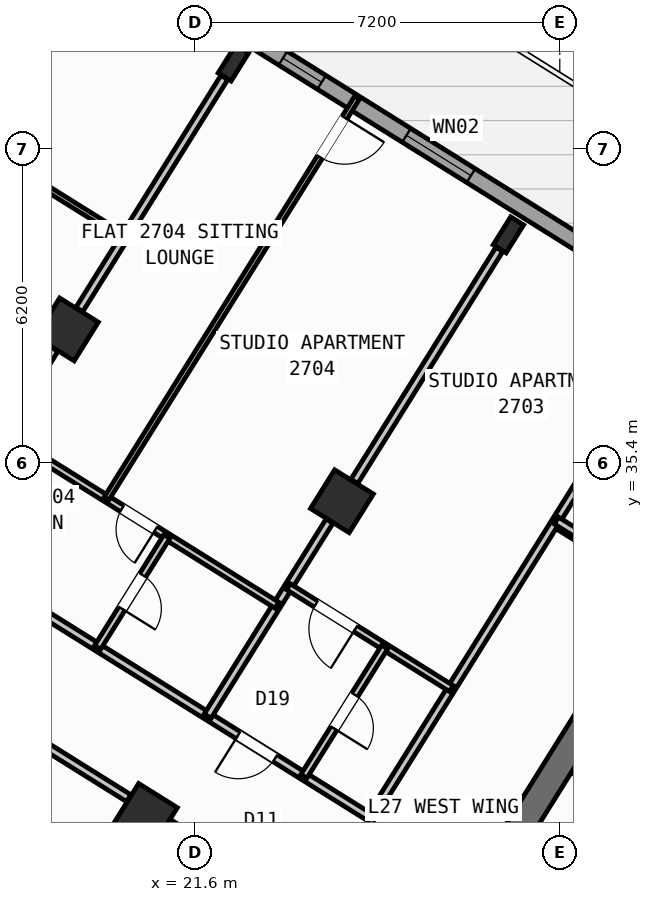
"""IFC4 building model, lengths in metres.
Left out: names, types, materials, properties, quantities, classifications, styles, units other than length and angle.
Written with IfcOpenShell. Run it as: python <this file> out.ifc"""

import sys

from ifc_helpers import new_model, si_unit, direction, frame, frame_2d, origin, origin_2d, place, context, subcontext, project, spatial, rectangle, hollow_rectangle, i_section, extrude, source, transform, mapped, element, fill, save


model = new_model("IFC4")
c1 = context("Model", 3, precision=1e-05, world=origin(), true_north=direction((0.0, 1.0)))
c2 = subcontext(c1, "Body", "Model", "MODEL_VIEW")
j1 = project(units=[si_unit("LENGTHUNIT", "METRE"), si_unit("PLANEANGLEUNIT", "RADIAN")], contexts=[c1])
p1 = place(None, origin())
s1 = spatial("IfcSite", under=j1, at=p1, CompositionType="ELEMENT")
p2 = place(p1, origin())
s2 = spatial("IfcBuilding", under=s1, at=p2, CompositionType="ELEMENT")
p3 = place(p2, frame((0.0, 0.0, 108.9)))
s3 = spatial("IfcBuildingStorey", under=s2, at=p3, CompositionType="ELEMENT", Elevation=108.9)
p4 = place(p3, frame((29.517, 30.594, 0.0), z_axis=(0.0, 0.0, 1.0), x_axis=(-0.529906864564, -0.848055844204, 0.0)))
e1 = element("IfcWall", 1, at=p4, inside=s3, PredefinedType="SHEAR", context=c2, shape_type="SweptSolid", body=[
    extrude(rectangle(XDim=3.575, YDim=0.55, at=frame_2d((1.788, 0.0))), origin(), (0.0, 0.0, 1.0), 3.35),
])
m1 = source(origin(), c2, "Body", "SweptSolid", [
    extrude(i_section(OverallWidth=0.3, OverallDepth=0.65, WebThickness=0.016, FlangeThickness=0.031, at=origin_2d()), origin(), (0.0, 0.0, 1.0), 3.6),
])
p5 = place(p3, frame((27.786, 39.901, 0.0), z_axis=(0.0, 0.0, 1.0), x_axis=(-0.848048096156, 0.529919264233, 0.0)))
e2 = element("IfcColumn", 2, at=p5, inside=s3, PredefinedType="COLUMN", context=c2, shape_type="MappedRepresentation", body=[
    mapped(m1, transform((0.0, 0.0, 0.0), scale=1.0)),
])
m2 = source(origin(), c2, "Body", "SweptSolid", [
    extrude(hollow_rectangle(XDim=0.9, YDim=0.9, WallThickness=0.036, at=origin_2d()), origin(), (0.0, 0.0, 1.0), 3.6),
])
for number, where, z_axis, x_axis in (
    (3, (24.5, 34.643, 0.0), (0.0, 0.0, 1.0), (-0.848, 0.53, 0.0)),
    (4, (20.632, 28.452, 0.0), (0.0, 0.0, 1.0), (-0.848, 0.53, 0.0)),
):
    element("IfcColumn", number, at=place(p3, frame(where, z_axis=z_axis, x_axis=x_axis)), inside=s3, PredefinedType="COLUMN", context=c2, shape_type="MappedRepresentation", body=[
        mapped(m2, transform((0.0, 0.0, 0.0), scale=1.0)),
    ])
p6 = place(p3, frame((22.358, 43.292, 0.0), z_axis=(0.0, 0.0, 1.0), x_axis=(-0.848048096156, 0.529919264233, 0.0)))
e5 = element("IfcColumn", 5, at=p6, inside=s3, PredefinedType="COLUMN", context=c2, shape_type="MappedRepresentation", body=[
    mapped(m1, transform((0.0, 0.0, 0.0), scale=1.0)),
])
p7 = place(p3, frame((19.073, 38.034, 0.0), z_axis=(0.0, 0.0, 1.0), x_axis=(-0.848048096156, 0.529919264233, 0.0)))
e6 = element("IfcColumn", 6, at=p7, inside=s3, PredefinedType="COLUMN", context=c2, shape_type="MappedRepresentation", body=[
    mapped(m2, transform((0.0, 0.0, 0.0), scale=1.0)),
])
p8 = place(p3, frame((31.76, 12.183, 0.0), z_axis=(0.0, 0.0, 1.0), x_axis=(-0.848047074256, 0.529920899612, 0.0)))
e7 = element("IfcWall", 7, at=p8, inside=s3, PredefinedType="STANDARD", context=c2, shape_type="SweptSolid", body=[
    extrude(rectangle(XDim=30.652, YDim=0.32, at=frame_2d((15.326, 0.0))), origin(), (0.0, 0.0, 1.0), 3.35),
])
p9 = place(p8, frame((15.153, 0.0, 0.0)))
e8 = element("IfcOpeningElement", 8, at=p9, cuts=e7, PredefinedType="OPENING", context=c2, shape_type="SweptSolid", body=[
    extrude(rectangle(XDim=1.2, YDim=2.15, at=frame_2d((0.6, 1.075))), frame((0.0, 0.17, 0.0), z_axis=(0.0, -1.0, 0.0), x_axis=(1.0, 0.0, 0.0)), (0.0, 0.0, 1.0), 0.34),
])
p10 = place(p8, frame((2.002, 0.0, 0.8)))
e9 = element("IfcOpeningElement", 9, at=p10, cuts=e7, PredefinedType="OPENING", context=c2, shape_type="SweptSolid", body=[
    extrude(rectangle(XDim=2.1, YDim=1.55, at=frame_2d((1.05, 0.775))), frame((0.0, 0.17, 0.0), z_axis=(0.0, -1.0, 0.0), x_axis=(1.0, 0.0, 0.0)), (0.0, 0.0, 1.0), 0.34),
])
p11 = place(p8, frame((7.206, 0.0, 0.8)))
e10 = element("IfcOpeningElement", 10, at=p11, cuts=e7, PredefinedType="OPENING", context=c2, shape_type="SweptSolid", body=[
    extrude(rectangle(XDim=2.1, YDim=1.55, at=frame_2d((1.05, 0.775))), frame((0.0, 0.17, 0.0), z_axis=(0.0, -1.0, 0.0), x_axis=(1.0, 0.0, 0.0)), (0.0, 0.0, 1.0), 0.34),
])
p12 = place(p8, frame((12.648, 0.0, 1.0)))
e11 = element("IfcOpeningElement", 11, at=p12, cuts=e7, PredefinedType="OPENING", context=c2, shape_type="SweptSolid", body=[
    extrude(rectangle(XDim=0.9, YDim=1.25, at=frame_2d((0.45, 0.625))), frame((0.0, 0.17, 0.0), z_axis=(0.0, -1.0, 0.0), x_axis=(1.0, 0.0, 0.0)), (0.0, 0.0, 1.0), 0.34),
])
p13 = place(p8, frame((19.59, 0.0, 0.95)))
e12 = element("IfcOpeningElement", 12, at=p13, cuts=e7, PredefinedType="OPENING", context=c2, shape_type="SweptSolid", body=[
    extrude(rectangle(XDim=1.2, YDim=1.4, at=frame_2d((0.6, 0.7))), frame((0.0, 0.17, 0.0), z_axis=(0.0, -1.0, 0.0), x_axis=(1.0, 0.0, 0.0)), (0.0, 0.0, 1.0), 0.34),
])
p14 = place(p8, frame((25.966, 0.0, 1.0)))
e13 = element("IfcOpeningElement", 13, at=p14, cuts=e7, PredefinedType="OPENING", context=c2, shape_type="SweptSolid", body=[
    extrude(rectangle(XDim=0.9, YDim=1.25, at=frame_2d((0.45, 0.625))), frame((0.0, 0.17, 0.0), z_axis=(0.0, -1.0, 0.0), x_axis=(1.0, 0.0, 0.0)), (0.0, 0.0, 1.0), 0.34),
])
p15 = place(p8, frame((28.871, 0.0, 1.0)))
e14 = element("IfcOpeningElement", 14, at=p15, cuts=e7, PredefinedType="OPENING", context=c2, shape_type="SweptSolid", body=[
    extrude(rectangle(XDim=0.9, YDim=1.25, at=frame_2d((0.45, 0.625))), frame((0.0, 0.17, 0.0), z_axis=(0.0, -1.0, 0.0), x_axis=(1.0, 0.0, 0.0)), (0.0, 0.0, 1.0), 0.34),
])
p16 = place(p3, frame((17.424, 47.083, 0.0), z_axis=(0.0, 0.0, 1.0), x_axis=(0.848049927979, -0.529916332693, 0.0)))
e15 = element("IfcWall", 15, at=p16, inside=s3, PredefinedType="STANDARD", context=c2, shape_type="SweptSolid", body=[
    extrude(rectangle(XDim=29.223, YDim=0.32, at=frame_2d((14.612, 0.0))), origin(), (0.0, 0.0, 1.0), 3.35),
])
p17 = place(p16, frame((3.77, 0.0, 0.0)))
e16 = element("IfcOpeningElement", 16, at=p17, cuts=e15, PredefinedType="OPENING", context=c2, shape_type="SweptSolid", body=[
    extrude(rectangle(XDim=1.05, YDim=2.15, at=frame_2d((0.525, 1.075))), frame((0.0, 0.17, 0.0), z_axis=(0.0, -1.0, 0.0), x_axis=(1.0, 0.0, 0.0)), (0.0, 0.0, 1.0), 0.34),
])
p18 = place(p16, frame((0.9, 0.0, 0.8)))
e17 = element("IfcOpeningElement", 17, at=p18, cuts=e15, PredefinedType="OPENING", context=c2, shape_type="SweptSolid", body=[
    extrude(rectangle(XDim=2.1, YDim=1.55, at=frame_2d((1.05, 0.775))), frame((0.0, 0.17, 0.0), z_axis=(0.0, -1.0, 0.0), x_axis=(1.0, 0.0, 0.0)), (0.0, 0.0, 1.0), 0.34),
])
p19 = place(p16, frame((6.972, 0.0, 1.0)))
e18 = element("IfcOpeningElement", 18, at=p19, cuts=e15, PredefinedType="OPENING", context=c2, shape_type="SweptSolid", body=[
    extrude(rectangle(XDim=0.9, YDim=1.25, at=frame_2d((0.45, 0.625))), frame((0.0, 0.17, 0.0), z_axis=(0.0, -1.0, 0.0), x_axis=(1.0, 0.0, 0.0)), (0.0, 0.0, 1.0), 0.34),
])
p20 = place(p16, frame((9.847, 0.0, 0.85)))
e19 = element("IfcOpeningElement", 19, at=p20, cuts=e15, PredefinedType="OPENING", context=c2, shape_type="SweptSolid", body=[
    extrude(rectangle(XDim=1.5, YDim=1.5, at=frame_2d((0.75, 0.75))), frame((0.0, 0.17, 0.0), z_axis=(0.0, -1.0, 0.0), x_axis=(1.0, 0.0, 0.0)), (0.0, 0.0, 1.0), 0.34),
])
p21 = place(p16, frame((13.889, 0.0, 0.95)))
e20 = element("IfcOpeningElement", 20, at=p21, cuts=e15, PredefinedType="OPENING", context=c2, shape_type="SweptSolid", body=[
    extrude(rectangle(XDim=1.2, YDim=1.4, at=frame_2d((0.6, 0.7))), frame((0.0, 0.17, 0.0), z_axis=(0.0, -1.0, 0.0), x_axis=(1.0, 0.0, 0.0)), (0.0, 0.0, 1.0), 0.34),
])
p22 = place(p16, frame((17.254, 0.0, 1.0)))
e21 = element("IfcOpeningElement", 21, at=p22, cuts=e15, PredefinedType="OPENING", context=c2, shape_type="SweptSolid", body=[
    extrude(rectangle(XDim=0.9, YDim=1.25, at=frame_2d((0.45, 0.625))), frame((0.0, 0.17, 0.0), z_axis=(0.0, -1.0, 0.0), x_axis=(1.0, 0.0, 0.0)), (0.0, 0.0, 1.0), 0.34),
])
p23 = place(p16, frame((20.764, 0.0, 0.8)))
e22 = element("IfcOpeningElement", 22, at=p23, cuts=e15, PredefinedType="OPENING", context=c2, shape_type="SweptSolid", body=[
    extrude(rectangle(XDim=2.1, YDim=1.55, at=frame_2d((1.05, 0.775))), frame((0.0, 0.17, 0.0), z_axis=(0.0, -1.0, 0.0), x_axis=(1.0, 0.0, 0.0)), (0.0, 0.0, 1.0), 0.34),
])
p24 = place(p16, frame((25.403, 0.0, 0.8)))
e23 = element("IfcOpeningElement", 23, at=p24, cuts=e15, PredefinedType="OPENING", context=c2, shape_type="SweptSolid", body=[
    extrude(rectangle(XDim=2.1, YDim=1.55, at=frame_2d((1.05, 0.775))), frame((0.0, 0.17, 0.0), z_axis=(0.0, -1.0, 0.0), x_axis=(1.0, 0.0, 0.0)), (0.0, 0.0, 1.0), 0.34),
])
p25 = place(p3, frame((30.914, 32.829, 0.0), z_axis=(0.0, 0.0, 1.0), x_axis=(-0.848008813643, 0.529982124211, 0.0)))
e24 = element("IfcWall", 24, at=p25, inside=s3, PredefinedType="PARTITIONING", context=c2, shape_type="SweptSolid", body=[
    extrude(rectangle(XDim=2.61, YDim=0.16, at=frame_2d((1.305, 0.0))), origin(), (0.0, 0.0, 1.0), 3.34),
])
p26 = place(p3, frame((31.239, 38.274, 0.0), z_axis=(0.0, 0.0, 1.0), x_axis=(-0.529925472745, -0.848044216616, 0.0)))
e25 = element("IfcWall", 25, at=p26, inside=s3, PredefinedType="PARTITIONING", context=c2, shape_type="SweptSolid", body=[
    extrude(rectangle(XDim=11.65, YDim=0.16, at=frame_2d((5.825, 0.0))), origin(), (0.0, 0.0, 1.0), 3.34),
])
p27 = place(p3, frame((25.065, 28.394, 0.0), z_axis=(0.0, 0.0, 1.0), x_axis=(-0.848048310262, 0.529918921593, 0.0)))
e26 = element("IfcWall", 26, at=p27, inside=s3, PredefinedType="PARTITIONING", context=c2, shape_type="SweptSolid", body=[
    extrude(rectangle(XDim=16.73, YDim=0.16, at=frame_2d((8.365, 0.0))), origin(), (0.0, 0.0, 1.0), 3.34),
])
p28 = place(p27, frame((2.22, 0.0, 0.0)))
e27 = element("IfcOpeningElement", 27, at=p28, cuts=e26, PredefinedType="OPENING", context=c2, shape_type="SweptSolid", body=[
    extrude(rectangle(XDim=0.86, YDim=2.05, at=frame_2d((0.43, 1.025))), frame((0.0, 0.09, 0.0), z_axis=(0.0, -1.0, 0.0), x_axis=(1.0, 0.0, 0.0)), (0.0, 0.0, 1.0), 0.18),
])
p29 = place(p27, frame((7.82, 0.0, 0.0)))
e28 = element("IfcOpeningElement", 28, at=p29, cuts=e26, PredefinedType="OPENING", context=c2, shape_type="SweptSolid", body=[
    extrude(rectangle(XDim=1.0, YDim=2.1, at=frame_2d((0.5, 1.05))), frame((0.0, 0.09, 0.0), z_axis=(0.0, -1.0, 0.0), x_axis=(1.0, 0.0, 0.0)), (0.0, 0.0, 1.0), 0.18),
])
p30 = place(p27, frame((12.95, 0.0, 0.0)))
e29 = element("IfcOpeningElement", 29, at=p30, cuts=e26, PredefinedType="OPENING", context=c2, shape_type="SweptSolid", body=[
    extrude(rectangle(XDim=1.0, YDim=2.1, at=frame_2d((0.5, 1.05))), frame((0.0, 0.09, 0.0), z_axis=(0.0, -1.0, 0.0), x_axis=(1.0, 0.0, 0.0)), (0.0, 0.0, 1.0), 0.18),
])
p31 = place(p3, frame((23.899, 26.529, 0.0), z_axis=(0.0, 0.0, 1.0), x_axis=(-0.848064240775, 0.529893426567, 0.0)))
e30 = element("IfcWall", 30, at=p31, inside=s3, PredefinedType="PARTITIONING", context=c2, shape_type="SweptSolid", body=[
    extrude(rectangle(XDim=3.328, YDim=0.16, at=frame_2d((1.664, 0.0))), origin(), (0.0, 0.0, 1.0), 2.775),
])
p32 = place(p31, frame((1.395, 0.0, 0.0)))
e31 = element("IfcOpeningElement", 31, at=p32, cuts=e30, PredefinedType="OPENING", context=c2, shape_type="SweptSolid", body=[
    extrude(rectangle(XDim=1.0, YDim=2.1, at=frame_2d((0.5, 1.05))), frame((0.0, 0.09, 0.0), z_axis=(0.0, -1.0, 0.0), x_axis=(1.0, 0.0, 0.0)), (0.0, 0.0, 1.0), 0.18),
])
p33 = place(p3, frame((20.293, 28.782, 0.0), z_axis=(0.0, 0.0, 1.0), x_axis=(-0.848040881926, 0.529930809241, 0.0)))
e32 = element("IfcWall", 32, at=p33, inside=s3, PredefinedType="PARTITIONING", context=c2, shape_type="SweptSolid", body=[
    extrude(rectangle(XDim=5.476, YDim=0.16, at=frame_2d((2.738, 0.0))), origin(), (0.0, 0.0, 1.0), 2.775),
])
p34 = place(p33, frame((3.568, 0.0, 0.0)))
e33 = element("IfcOpeningElement", 33, at=p34, cuts=e32, PredefinedType="OPENING", context=c2, shape_type="SweptSolid", body=[
    extrude(rectangle(XDim=1.0, YDim=2.1, at=frame_2d((0.5, 1.05))), frame((0.0, 0.09, 0.0), z_axis=(0.0, -1.0, 0.0), x_axis=(1.0, 0.0, 0.0)), (0.0, 0.0, 1.0), 0.18),
])
p35 = place(p3, frame((19.318, 26.349, 0.0), z_axis=(0.0, 0.0, 1.0), x_axis=(-0.848039019877, 0.529933789039, 0.0)))
e34 = element("IfcWall", 34, at=p35, inside=s3, PredefinedType="PLUMBINGWALL", context=c2, shape_type="SweptSolid", body=[
    extrude(rectangle(XDim=6.4, YDim=0.14, at=frame_2d((3.2, 0.0))), origin(), (0.0, 0.0, 1.0), 3.34),
])
p36 = place(p35, frame((2.824, 0.0, 0.0)))
e35 = element("IfcOpeningElement", 35, at=p36, cuts=e34, PredefinedType="OPENING", context=c2, shape_type="SweptSolid", body=[
    extrude(rectangle(XDim=0.78, YDim=2.05, at=frame_2d((0.39, 1.025))), frame((0.0, 0.08, 0.0), z_axis=(0.0, -1.0, 0.0), x_axis=(1.0, 0.0, 0.0)), (0.0, 0.0, 1.0), 0.16),
])
p37 = place(p3, frame((27.607, 39.615, 0.0), z_axis=(0.0, 0.0, 1.0), x_axis=(-0.529913610495, -0.848051628978, 0.0)))
e36 = element("IfcWall", 36, at=p37, inside=s3, PredefinedType="PARTITIONING", context=c2, shape_type="SweptSolid", body=[
    extrude(rectangle(XDim=5.401, YDim=0.16, at=frame_2d((2.7, 0.0))), origin(), (0.0, 0.0, 1.0), 2.775),
])
p38 = place(p3, frame((24.256, 34.251, 0.0), z_axis=(0.0, 0.0, 1.0), x_axis=(-0.529926399231, -0.848043637673, 0.0)))
e37 = element("IfcWall", 37, at=p38, inside=s3, PredefinedType="PARTITIONING", context=c2, shape_type="SweptSolid", body=[
    extrude(rectangle(XDim=4.538, YDim=0.16, at=frame_2d((2.269, 0.0))), origin(), (0.0, 0.0, 1.0), 2.775),
])
p39 = place(p3, frame((26.66, 30.947, 0.0), z_axis=(0.0, 0.0, 1.0), x_axis=(-0.84803087207, 0.529946827537, 0.0)))
e38 = element("IfcWall", 38, at=p39, inside=s3, PredefinedType="PLUMBINGWALL", context=c2, shape_type="SweptSolid", body=[
    extrude(rectangle(XDim=3.79, YDim=0.14, at=frame_2d((1.895, 0.0))), origin(), (0.0, 0.0, 1.0), 3.34),
])
p40 = place(p39, frame((2.23, 0.0, 0.0)))
e39 = element("IfcOpeningElement", 39, at=p40, cuts=e38, PredefinedType="OPENING", context=c2, shape_type="SweptSolid", body=[
    extrude(rectangle(XDim=0.92, YDim=2.08, at=frame_2d((0.46, 1.04))), frame((0.0, 0.08, 0.0), z_axis=(0.0, -1.0, 0.0), x_axis=(1.0, 0.0, 0.0)), (0.0, 0.0, 1.0), 0.16),
])
p41 = place(p3, frame((25.345, 31.768, 0.0), z_axis=(0.0, 0.0, 1.0), x_axis=(-0.529882284462, -0.848071202561, 0.0)))
e40 = element("IfcWall", 40, at=p41, inside=s3, PredefinedType="PLUMBINGWALL", context=c2, shape_type="SweptSolid", body=[
    extrude(rectangle(XDim=3.01, YDim=0.14, at=frame_2d((1.505, 0.0))), origin(), (0.0, 0.0, 1.0), 2.995),
])
p42 = place(p41, frame((1.115, 0.0, 0.0)))
e41 = element("IfcOpeningElement", 41, at=p42, cuts=e40, PredefinedType="OPENING", context=c2, shape_type="SweptSolid", body=[
    extrude(rectangle(XDim=0.78, YDim=2.05, at=frame_2d((0.39, 1.025))), frame((0.0, 0.08, 0.0), z_axis=(0.0, -1.0, 0.0), x_axis=(1.0, 0.0, 0.0)), (0.0, 0.0, 1.0), 0.16),
])
p43 = place(p3, frame((22.18, 43.006, 0.0), z_axis=(0.0, 0.0, 1.0), x_axis=(-0.529913610495, -0.848051628978, 0.0)))
e42 = element("IfcWall", 42, at=p43, inside=s3, PredefinedType="PARTITIONING", context=c2, shape_type="SweptSolid", body=[
    extrude(rectangle(XDim=5.401, YDim=0.16, at=frame_2d((2.7, 0.0))), origin(), (0.0, 0.0, 1.0), 2.775),
])
p44 = place(p3, frame((18.828, 37.643, 0.0), z_axis=(0.0, 0.0, 1.0), x_axis=(-0.529926399231, -0.848043637673, 0.0)))
e43 = element("IfcWall", 43, at=p44, inside=s3, PredefinedType="PARTITIONING", context=c2, shape_type="SweptSolid", body=[
    extrude(rectangle(XDim=4.538, YDim=0.16, at=frame_2d((2.269, 0.0))), origin(), (0.0, 0.0, 1.0), 2.775),
])
p45 = place(p3, frame((23.218, 32.591, 0.0), z_axis=(0.0, 0.0, 1.0), x_axis=(-0.848056163074, 0.529906354247, 0.0)))
e44 = element("IfcWall", 44, at=p45, inside=s3, PredefinedType="PLUMBINGWALL", context=c2, shape_type="SweptSolid", body=[
    extrude(rectangle(XDim=6.4, YDim=0.14, at=frame_2d((3.2, 0.0))), origin(), (0.0, 0.0, 1.0), 3.34),
])
p46 = place(p45, frame((2.824, 0.0, 0.0)))
e45 = element("IfcOpeningElement", 45, at=p46, cuts=e44, PredefinedType="OPENING", context=c2, shape_type="SweptSolid", body=[
    extrude(rectangle(XDim=0.78, YDim=2.05, at=frame_2d((0.39, 1.025))), frame((0.0, 0.08, 0.0), z_axis=(0.0, -1.0, 0.0), x_axis=(1.0, 0.0, 0.0)), (0.0, 0.0, 1.0), 0.16),
])
p47 = place(p3, frame((21.047, 33.947, 0.0), z_axis=(0.0, 0.0, 1.0), x_axis=(-0.529913878929, -0.848051461244, 0.0)))
e46 = element("IfcWall", 46, at=p47, inside=s3, PredefinedType="PLUMBINGWALL", context=c2, shape_type="SweptSolid", body=[
    extrude(rectangle(XDim=2.58, YDim=0.14, at=frame_2d((1.29, 0.0))), origin(), (0.0, 0.0, 1.0), 3.34),
])
p48 = place(p47, frame((0.9, 0.0, 0.0)))
e47 = element("IfcOpeningElement", 47, at=p48, cuts=e46, PredefinedType="OPENING", context=c2, shape_type="SweptSolid", body=[
    extrude(rectangle(XDim=0.78, YDim=2.05, at=frame_2d((0.39, 1.025))), frame((0.0, 0.08, 0.0), z_axis=(0.0, -1.0, 0.0), x_axis=(1.0, 0.0, 0.0)), (0.0, 0.0, 1.0), 0.16),
])
p49 = place(p3, frame((24.802, 42.614, 0.0), z_axis=(0.0, 0.0, 1.0), x_axis=(-0.529926099889, -0.848043824727, 0.0)))
e48 = element("IfcWall", 48, at=p49, inside=s3, PredefinedType="PARTITIONING", context=c2, shape_type="SweptSolid", body=[
    extrude(rectangle(XDim=9.34, YDim=0.11, at=frame_2d((4.67, 0.0))), origin(), (0.0, 0.0, 1.0), 3.34),
])
p50 = place(p49, frame((0.47, 0.0, 0.0)))
e49 = element("IfcOpeningElement", 49, at=p50, cuts=e48, PredefinedType="OPENING", context=c2, shape_type="SweptSolid", body=[
    extrude(rectangle(XDim=0.92, YDim=2.08, at=frame_2d((0.46, 1.04))), frame((0.0, 0.065, 0.0), z_axis=(0.0, -1.0, 0.0), x_axis=(1.0, 0.0, 0.0)), (0.0, 0.0, 1.0), 0.13),
])
p51 = place(p3, frame((20.213, 39.859, 0.0), z_axis=(0.0, 0.0, 1.0), x_axis=(-0.848048787466, 0.529918157905, 0.0)))
e50 = element("IfcWall", 50, at=p51, inside=s3, PredefinedType="PARTITIONING", context=c2, shape_type="SweptSolid", body=[
    extrude(rectangle(XDim=6.52, YDim=0.11, at=frame_2d((3.26, 0.0))), origin(), (0.0, 0.0, 1.0), 3.34),
])
p52 = place(p51, frame((2.8, 0.0, 0.0)))
e51 = element("IfcOpeningElement", 51, at=p52, cuts=e50, PredefinedType="OPENING", context=c2, shape_type="SweptSolid", body=[
    extrude(rectangle(XDim=0.92, YDim=2.08, at=frame_2d((0.46, 1.04))), frame((0.0, 0.065, 0.0), z_axis=(0.0, -1.0, 0.0), x_axis=(1.0, 0.0, 0.0)), (0.0, 0.0, 1.0), 0.13),
])
p53 = place(p3, frame((41.936, 26.012, 0.0), z_axis=(0.0, 0.0, 1.0), x_axis=(-0.848051154596, 0.529914369676, 0.0)))
e52 = element("IfcWall", 52, at=p53, inside=s3, PredefinedType="PARTITIONING", context=c2, shape_type="SweptSolid", body=[
    extrude(rectangle(XDim=15.57, YDim=0.16, at=frame_2d((7.785, 0.0))), origin(), (0.0, 0.0, 1.0), 3.34),
])
p54 = place(p53, frame((10.83, 0.0, 0.0)))
e53 = element("IfcOpeningElement", 53, at=p54, cuts=e52, PredefinedType="OPENING", context=c2, shape_type="SweptSolid", body=[
    extrude(rectangle(XDim=1.0, YDim=2.1, at=frame_2d((0.5, 1.05))), frame((0.0, 0.09, 0.0), z_axis=(0.0, -1.0, 0.0), x_axis=(1.0, 0.0, 0.0)), (0.0, 0.0, 1.0), 0.18),
])
m3 = source(origin(), c2, "Body", "SweptSolid", [
    extrude(rectangle(XDim=0.9, YDim=1.25, at=frame_2d((0.45, 0.625))), frame((0.0, 0.03, 0.0), z_axis=(0.0, -1.0, 0.0), x_axis=(1.0, 0.0, 0.0)), (0.0, 0.0, 1.0), 0.06),
])
p55 = place(p19, origin())
e54 = element("IfcWindow", 54, at=p55, inside=s3, PartitioningType="SINGLE_PANEL", PredefinedType="WINDOW", context=c2, shape_type="MappedRepresentation", body=[
    mapped(m3, transform((0.0, 0.0, 0.0), scale=1.0)),
])
fill(e18, e54)
m4 = source(origin(), c2, "Body", "SweptSolid", [
    extrude(rectangle(XDim=1.5, YDim=1.5, at=frame_2d((0.75, 0.75))), frame((0.0, 0.03, 0.0), z_axis=(0.0, -1.0, 0.0), x_axis=(1.0, 0.0, 0.0)), (0.0, 0.0, 1.0), 0.06),
])
p56 = place(p20, origin())
e55 = element("IfcWindow", 55, at=p56, inside=s3, PartitioningType="SINGLE_PANEL", PredefinedType="WINDOW", context=c2, shape_type="MappedRepresentation", body=[
    mapped(m4, transform((0.0, 0.0, 0.0), scale=1.0)),
])
fill(e19, e55)
m5 = source(origin(), c2, "Body", "SweptSolid", [
    extrude(rectangle(XDim=0.86, YDim=2.05, at=frame_2d((0.43, 1.025))), frame((0.0, 0.025, 0.0), z_axis=(0.0, -1.0, 0.0), x_axis=(1.0, 0.0, 0.0)), (0.0, 0.0, 1.0), 0.05),
])
p57 = place(p28, origin())
e56 = element("IfcDoor", 56, at=p57, inside=s3, OperationType="SINGLE_SWING_RIGHT", PredefinedType="DOOR", context=c2, shape_type="MappedRepresentation", body=[
    mapped(m5, transform((0.0, 0.0, 0.0), scale=1.0)),
])
fill(e27, e56)
m6 = source(origin(), c2, "Body", "SweptSolid", [
    extrude(rectangle(XDim=0.92, YDim=2.08, at=frame_2d((0.46, 1.04))), frame((0.0, 0.025, 0.0), z_axis=(0.0, -1.0, 0.0), x_axis=(1.0, 0.0, 0.0)), (0.0, 0.0, 1.0), 0.05),
])
p58 = place(p40, origin())
e57 = element("IfcDoor", 57, at=p58, inside=s3, OperationType="SINGLE_SWING_LEFT", PredefinedType="DOOR", context=c2, shape_type="MappedRepresentation", body=[
    mapped(m6, transform((0.0, 0.0, 0.0), scale=1.0)),
])
fill(e39, e57)
m7 = source(origin(), c2, "Body", "SweptSolid", [
    extrude(rectangle(XDim=0.78, YDim=2.05, at=frame_2d((0.39, 1.025))), frame((0.0, 0.025, 0.0), z_axis=(0.0, -1.0, 0.0), x_axis=(1.0, 0.0, 0.0)), (0.0, 0.0, 1.0), 0.05),
])
p59 = place(p42, origin())
e58 = element("IfcDoor", 58, at=p59, inside=s3, OperationType="SINGLE_SWING_RIGHT", PredefinedType="DOOR", context=c2, shape_type="MappedRepresentation", body=[
    mapped(m7, transform((0.0, 0.0, 0.0), scale=1.0)),
])
fill(e41, e58)
p60 = place(p50, origin())
e59 = element("IfcDoor", 59, at=p60, inside=s3, OperationType="SINGLE_SWING_LEFT", PredefinedType="DOOR", context=c2, shape_type="MappedRepresentation", body=[
    mapped(m6, transform((0.0, 0.0, 0.0), scale=1.0)),
])
fill(e49, e59)
p61 = place(p46, origin())
e60 = element("IfcDoor", 60, at=p61, inside=s3, OperationType="SINGLE_SWING_LEFT", PredefinedType="DOOR", context=c2, shape_type="MappedRepresentation", body=[
    mapped(m7, transform((0.0, 0.0, 0.0), scale=1.0)),
])
fill(e45, e60)
p62 = place(p48, origin())
e61 = element("IfcDoor", 61, at=p62, inside=s3, OperationType="SINGLE_SWING_RIGHT", PredefinedType="DOOR", context=c2, shape_type="MappedRepresentation", body=[
    mapped(m7, transform((0.0, 0.0, 0.0), scale=1.0)),
])
fill(e47, e61)
save(model, sys.argv[1])
